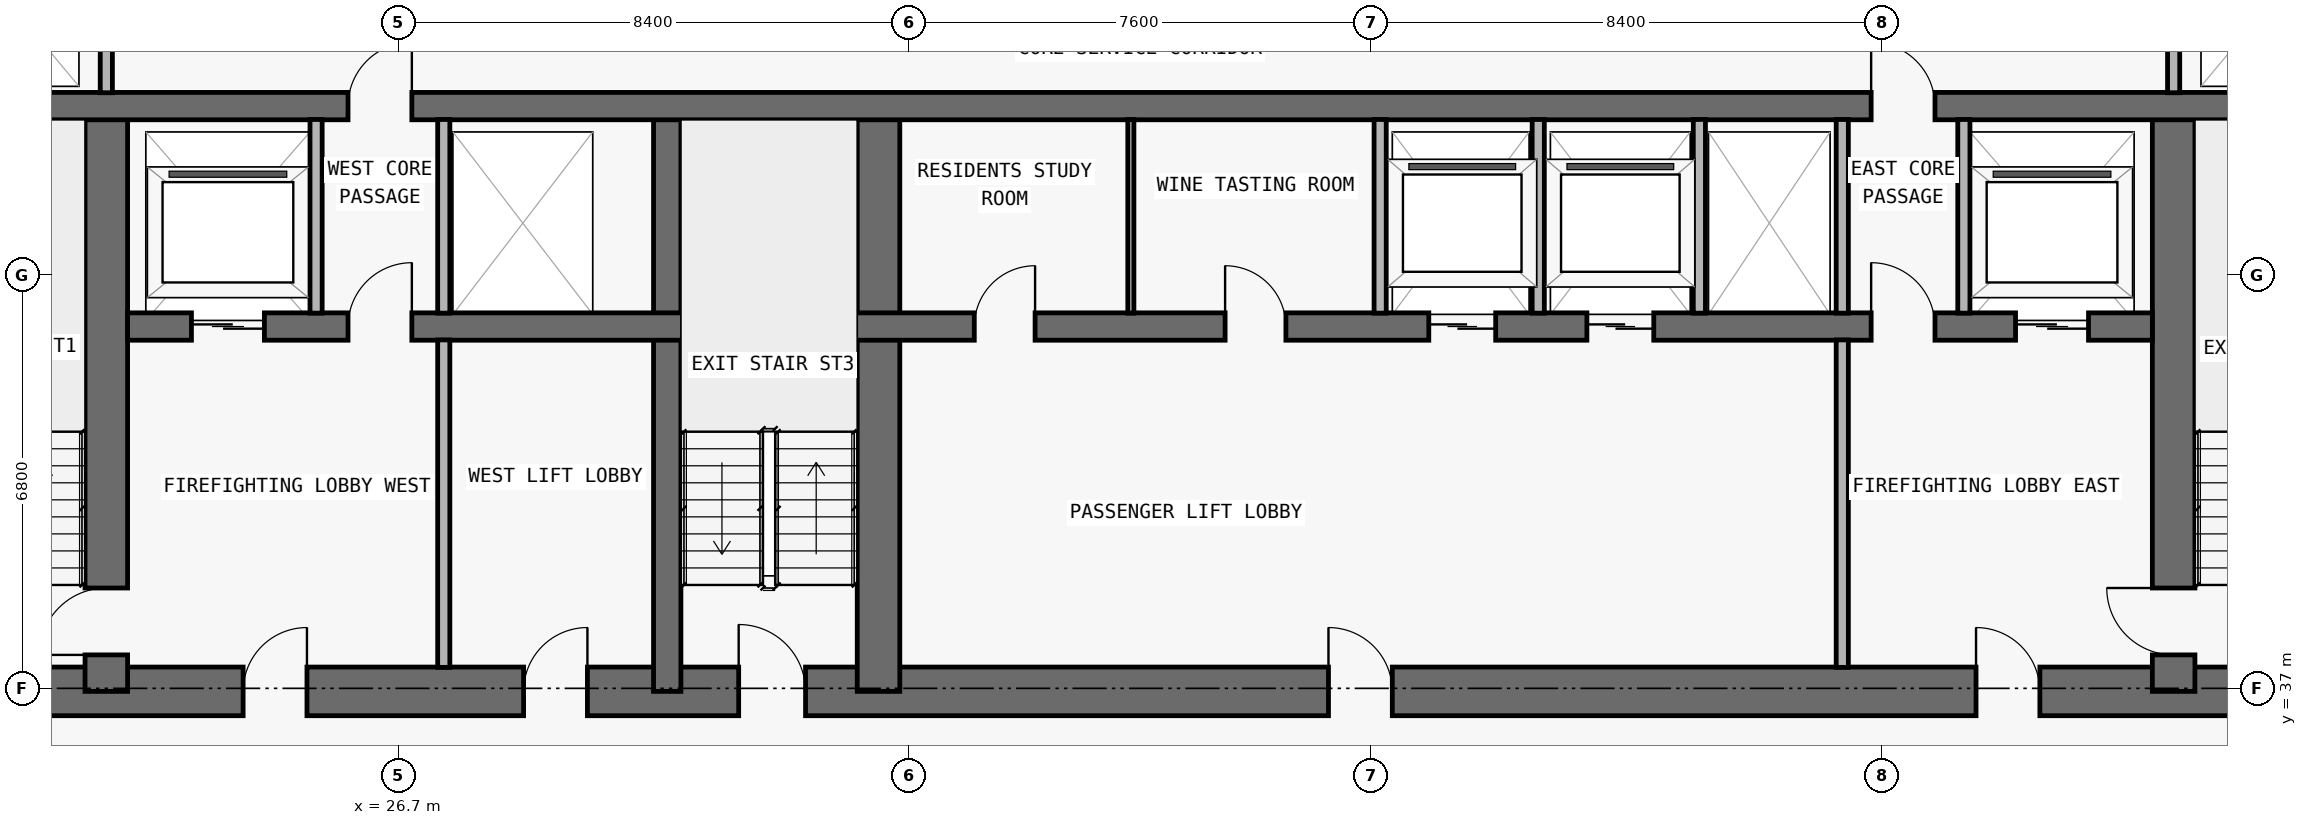
"""IFC4 building model, lengths in metres.
Left out: names, types, materials, properties, quantities, classifications, styles, units other than length and angle.
Written with IfcOpenShell. Run it as: python <this file> out.ifc"""

import sys

from ifc_helpers import new_model, si_unit, direction, frame, frame_2d, origin, place, context, subcontext, project, spatial, rectangle, extrude, element, fill, save


model = new_model("IFC4")
c1 = context("Model", 3, precision=1e-05, world=origin(), true_north=direction((0.0, 1.0)))
c2 = subcontext(c1, "Body", "Model", "MODEL_VIEW")
j1 = project(units=[si_unit("LENGTHUNIT", "METRE"), si_unit("PLANEANGLEUNIT", "RADIAN")], contexts=[c1])
p1 = place(None, origin())
s1 = spatial("IfcSite", under=j1, at=p1, CompositionType="ELEMENT")
p2 = place(p1, origin())
s2 = spatial("IfcBuilding", under=s1, at=p2, CompositionType="ELEMENT")
p3 = place(p2, frame((0.0, 0.0, 109.2)))
s3 = spatial("IfcBuildingStorey", under=s2, at=p3, CompositionType="ELEMENT", Elevation=109.2)
p4 = place(p3, frame((17.85, 36.95, 0.0), z_axis=(0.0, 0.0, 1.0), x_axis=(1.0, 0.0, 0.0)))
e1 = element("IfcWall", 1, at=p4, inside=s3, PredefinedType="SHEAR", context=c2, shape_type="SweptSolid", body=[
    extrude(rectangle(XDim=42.1, YDim=0.8, at=frame_2d((21.05, 0.0))), origin(), (0.0, 0.0, 1.0), 3.05),
])
p5 = place(p4, frame((14.45, 0.0, 0.0)))
e2 = element("IfcOpeningElement", 2, at=p5, cuts=e1, PredefinedType="OPENING", context=c2, shape_type="SweptSolid", body=[
    extrude(rectangle(XDim=1.1, YDim=2.15, at=frame_2d((0.55, 1.075))), frame((0.0, 0.41, 0.0), z_axis=(0.0, -1.0, 0.0), x_axis=(1.0, 0.0, 0.0)), (0.0, 0.0, 1.0), 0.82),
])
p6 = place(p4, frame((6.3, 0.0, 0.0)))
e3 = element("IfcOpeningElement", 3, at=p6, cuts=e1, PredefinedType="OPENING", context=c2, shape_type="SweptSolid", body=[
    extrude(rectangle(XDim=1.05, YDim=2.15, at=frame_2d((0.525, 1.075))), frame((0.0, 0.41, 0.0), z_axis=(0.0, -1.0, 0.0), x_axis=(1.0, 0.0, 0.0)), (0.0, 0.0, 1.0), 0.82),
])
p7 = place(p4, frame((34.8, 0.0, 0.0)))
e4 = element("IfcOpeningElement", 4, at=p7, cuts=e1, PredefinedType="OPENING", context=c2, shape_type="SweptSolid", body=[
    extrude(rectangle(XDim=1.05, YDim=2.15, at=frame_2d((0.525, 1.075))), frame((0.0, 0.41, 0.0), z_axis=(0.0, -1.0, 0.0), x_axis=(1.0, 0.0, 0.0)), (0.0, 0.0, 1.0), 0.82),
])
p8 = place(p4, frame((10.913, 0.0, 0.0)))
e5 = element("IfcOpeningElement", 5, at=p8, cuts=e1, PredefinedType="OPENING", context=c2, shape_type="SweptSolid", body=[
    extrude(rectangle(XDim=1.05, YDim=2.15, at=frame_2d((0.525, 1.075))), frame((0.0, 0.41, 0.0), z_axis=(0.0, -1.0, 0.0), x_axis=(1.0, 0.0, 0.0)), (0.0, 0.0, 1.0), 0.82),
])
p9 = place(p4, frame((24.15, 0.0, 0.0)))
e6 = element("IfcOpeningElement", 6, at=p9, cuts=e1, PredefinedType="OPENING", context=c2, shape_type="SweptSolid", body=[
    extrude(rectangle(XDim=1.05, YDim=2.15, at=frame_2d((0.525, 1.075))), frame((0.0, 0.41, 0.0), z_axis=(0.0, -1.0, 0.0), x_axis=(1.0, 0.0, 0.0)), (0.0, 0.0, 1.0), 0.82),
])
p10 = place(p3, frame((21.9, 36.95, 0.0), z_axis=(0.0, 0.0, 1.0), x_axis=(0.0, 1.0, 0.0)))
e7 = element("IfcWall", 7, at=p10, inside=s3, PredefinedType="SHEAR", context=c2, shape_type="SweptSolid", body=[
    extrude(rectangle(XDim=9.625, YDim=0.7, at=frame_2d((4.812, 0.0))), origin(), (0.0, 0.0, 1.0), 3.05),
])
p11 = place(p10, frame((0.6, 0.0, 0.0)))
e8 = element("IfcOpeningElement", 8, at=p11, cuts=e7, PredefinedType="OPENING", context=c2, shape_type="SweptSolid", body=[
    extrude(rectangle(XDim=1.1, YDim=2.15, at=frame_2d((0.55, 1.075))), frame((0.0, 0.36, 0.0), z_axis=(0.0, -1.0, 0.0), x_axis=(1.0, 0.0, 0.0)), (0.0, 0.0, 1.0), 0.72),
])
p12 = place(p3, frame((55.9, 36.95, 0.0), z_axis=(0.0, 0.0, 1.0), x_axis=(0.0, 1.0, 0.0)))
e9 = element("IfcWall", 9, at=p12, inside=s3, PredefinedType="SHEAR", context=c2, shape_type="SweptSolid", body=[
    extrude(rectangle(XDim=9.625, YDim=0.7, at=frame_2d((4.812, 0.0))), origin(), (0.0, 0.0, 1.0), 3.05),
])
p13 = place(p12, frame((0.6, 0.0, 0.0)))
e10 = element("IfcOpeningElement", 10, at=p13, cuts=e9, PredefinedType="OPENING", context=c2, shape_type="SweptSolid", body=[
    extrude(rectangle(XDim=1.1, YDim=2.15, at=frame_2d((0.55, 1.075))), frame((0.0, 0.36, 0.0), z_axis=(0.0, -1.0, 0.0), x_axis=(1.0, 0.0, 0.0)), (0.0, 0.0, 1.0), 0.72),
])
p14 = place(p3, frame((31.125, 36.95, 0.0), z_axis=(0.0, 0.0, 1.0), x_axis=(0.0, 1.0, 0.0)))
e11 = element("IfcWall", 11, at=p14, inside=s3, PredefinedType="SHEAR", context=c2, shape_type="SweptSolid", body=[
    extrude(rectangle(XDim=9.625, YDim=0.45, at=frame_2d((4.812, 0.0))), origin(), (0.0, 0.0, 1.0), 3.05),
])
p15 = place(p3, frame((34.6, 36.95, 0.0), z_axis=(0.0, 0.0, 1.0), x_axis=(0.0, 1.0, 0.0)))
e12 = element("IfcWall", 12, at=p15, inside=s3, PredefinedType="SHEAR", context=c2, shape_type="SweptSolid", body=[
    extrude(rectangle(XDim=9.625, YDim=0.7, at=frame_2d((4.812, 0.0))), origin(), (0.0, 0.0, 1.0), 3.05),
])
p16 = place(p3, frame((22.25, 42.95, 0.0), z_axis=(0.0, 0.0, 1.0), x_axis=(1.0, 0.0, 0.0)))
e13 = element("IfcWall", 13, at=p16, inside=s3, PredefinedType="SHEAR", context=c2, shape_type="SweptSolid", body=[
    extrude(rectangle(XDim=33.3, YDim=0.45, at=frame_2d((16.65, 0.0))), origin(), (0.0, 0.0, 1.0), 3.05),
])
p17 = place(p16, frame((1.05, 0.0, 0.0)))
e14 = element("IfcOpeningElement", 14, at=p17, cuts=e13, PredefinedType="OPENING", context=c2, shape_type="SweptSolid", body=[
    extrude(rectangle(XDim=1.2, YDim=2.2, at=frame_2d((0.6, 1.1))), frame((0.0, 0.235, 0.0), z_axis=(0.0, -1.0, 0.0), x_axis=(1.0, 0.0, 0.0)), (0.0, 0.0, 1.0), 0.47),
])
p18 = place(p16, frame((31.05, 0.0, 0.0)))
e15 = element("IfcOpeningElement", 15, at=p18, cuts=e13, PredefinedType="OPENING", context=c2, shape_type="SweptSolid", body=[
    extrude(rectangle(XDim=1.2, YDim=2.2, at=frame_2d((0.6, 1.1))), frame((0.0, 0.235, 0.0), z_axis=(0.0, -1.0, 0.0), x_axis=(1.0, 0.0, 0.0)), (0.0, 0.0, 1.0), 0.47),
])
p19 = place(p16, frame((21.4, 0.0, 0.0)))
e16 = element("IfcOpeningElement", 16, at=p19, cuts=e13, PredefinedType="OPENING", context=c2, shape_type="SweptSolid", body=[
    extrude(rectangle(XDim=1.1, YDim=2.2, at=frame_2d((0.55, 1.1))), frame((0.0, 0.235, 0.0), z_axis=(0.0, -1.0, 0.0), x_axis=(1.0, 0.0, 0.0)), (0.0, 0.0, 1.0), 0.47),
])
p20 = place(p16, frame((24.0, 0.0, 0.0)))
e17 = element("IfcOpeningElement", 17, at=p20, cuts=e13, PredefinedType="OPENING", context=c2, shape_type="SweptSolid", body=[
    extrude(rectangle(XDim=1.1, YDim=2.2, at=frame_2d((0.55, 1.1))), frame((0.0, 0.235, 0.0), z_axis=(0.0, -1.0, 0.0), x_axis=(1.0, 0.0, 0.0)), (0.0, 0.0, 1.0), 0.47),
])
p21 = place(p16, frame((3.625, 0.0, 0.0)))
e18 = element("IfcOpeningElement", 18, at=p21, cuts=e13, PredefinedType="OPENING", context=c2, shape_type="SweptSolid", body=[
    extrude(rectangle(XDim=1.05, YDim=2.15, at=frame_2d((0.525, 1.075))), frame((0.0, 0.235, 0.0), z_axis=(0.0, -1.0, 0.0), x_axis=(1.0, 0.0, 0.0)), (0.0, 0.0, 1.0), 0.47),
])
p22 = place(p16, frame((28.675, 0.0, 0.0)))
e19 = element("IfcOpeningElement", 19, at=p22, cuts=e13, PredefinedType="OPENING", context=c2, shape_type="SweptSolid", body=[
    extrude(rectangle(XDim=1.05, YDim=2.15, at=frame_2d((0.525, 1.075))), frame((0.0, 0.235, 0.0), z_axis=(0.0, -1.0, 0.0), x_axis=(1.0, 0.0, 0.0)), (0.0, 0.0, 1.0), 0.47),
])
p23 = place(p16, frame((13.925, 0.0, 0.0)))
e20 = element("IfcOpeningElement", 20, at=p23, cuts=e13, PredefinedType="OPENING", context=c2, shape_type="SweptSolid", body=[
    extrude(rectangle(XDim=1.0, YDim=2.2, at=frame_2d((0.5, 1.1))), frame((0.0, 0.235, 0.0), z_axis=(0.0, -1.0, 0.0), x_axis=(1.0, 0.0, 0.0)), (0.0, 0.0, 1.0), 0.47),
])
p24 = place(p16, frame((18.05, 0.0, 0.0)))
e21 = element("IfcOpeningElement", 21, at=p24, cuts=e13, PredefinedType="OPENING", context=c2, shape_type="SweptSolid", body=[
    extrude(rectangle(XDim=1.0, YDim=2.2, at=frame_2d((0.5, 1.1))), frame((0.0, 0.235, 0.0), z_axis=(0.0, -1.0, 0.0), x_axis=(1.0, 0.0, 0.0)), (0.0, 0.0, 1.0), 0.47),
])
p25 = place(p3, frame((18.25, 46.575, 0.0), z_axis=(0.0, 0.0, 1.0), x_axis=(1.0, 0.0, 0.0)))
e22 = element("IfcWall", 22, at=p25, inside=s3, PredefinedType="SHEAR", context=c2, shape_type="SweptSolid", body=[
    extrude(rectangle(XDim=41.3, YDim=0.45, at=frame_2d((20.65, 0.0))), origin(), (0.0, 0.0, 1.0), 3.05),
])
p26 = place(p25, frame((7.625, 0.0, 0.0)))
e23 = element("IfcOpeningElement", 23, at=p26, cuts=e22, PredefinedType="OPENING", context=c2, shape_type="SweptSolid", body=[
    extrude(rectangle(XDim=1.05, YDim=2.15, at=frame_2d((0.525, 1.075))), frame((0.0, 0.235, 0.0), z_axis=(0.0, -1.0, 0.0), x_axis=(1.0, 0.0, 0.0)), (0.0, 0.0, 1.0), 0.47),
])
p27 = place(p25, frame((32.675, 0.0, 0.0)))
e24 = element("IfcOpeningElement", 24, at=p27, cuts=e22, PredefinedType="OPENING", context=c2, shape_type="SweptSolid", body=[
    extrude(rectangle(XDim=1.05, YDim=2.15, at=frame_2d((0.525, 1.075))), frame((0.0, 0.235, 0.0), z_axis=(0.0, -1.0, 0.0), x_axis=(1.0, 0.0, 0.0)), (0.0, 0.0, 1.0), 0.47),
])
p28 = place(p3, frame((21.9, 46.795, 0.0), z_axis=(0.0, 0.0, 1.0), x_axis=(0.0, 1.0, 0.0)))
e25 = element("IfcWall", 25, at=p28, inside=s3, PredefinedType="PARTITIONING", context=c2, shape_type="SweptSolid", body=[
    extrude(rectangle(XDim=3.16, YDim=0.2, at=frame_2d((1.58, 0.0))), origin(), (0.0, 0.0, 1.0), 3.05),
])
p29 = place(p3, frame((25.35, 43.17, 0.0), z_axis=(0.0, 0.0, 1.0), x_axis=(0.0, 1.0, 0.0)))
e26 = element("IfcWall", 26, at=p29, inside=s3, PredefinedType="PARTITIONING", context=c2, shape_type="SweptSolid", body=[
    extrude(rectangle(XDim=3.185, YDim=0.2, at=frame_2d((1.593, 0.0))), origin(), (0.0, 0.0, 1.0), 3.05),
])
p30 = place(p3, frame((27.45, 37.345, 0.0), z_axis=(0.0, 0.0, 1.0), x_axis=(0.0, 1.0, 0.0)))
e27 = element("IfcWall", 27, at=p30, inside=s3, PredefinedType="PARTITIONING", context=c2, shape_type="SweptSolid", body=[
    extrude(rectangle(XDim=5.385, YDim=0.2, at=frame_2d((2.692, 0.0))), origin(), (0.0, 0.0, 1.0), 3.05),
])
p31 = place(p3, frame((27.45, 43.17, 0.0), z_axis=(0.0, 0.0, 1.0), x_axis=(0.0, 1.0, 0.0)))
e28 = element("IfcWall", 28, at=p31, inside=s3, PredefinedType="PARTITIONING", context=c2, shape_type="SweptSolid", body=[
    extrude(rectangle(XDim=3.185, YDim=0.2, at=frame_2d((1.593, 0.0))), origin(), (0.0, 0.0, 1.0), 3.05),
])
p32 = place(p3, frame((38.75, 43.17, 0.0), z_axis=(0.0, 0.0, 1.0), x_axis=(0.0, 1.0, 0.0)))
e29 = element("IfcWall", 29, at=p32, inside=s3, PredefinedType="MOVABLE", context=c2, shape_type="SweptSolid", body=[
    extrude(rectangle(XDim=3.185, YDim=0.1, at=frame_2d((1.593, 0.0))), origin(), (0.0, 0.0, 1.0), 3.05),
])
for number, where, z_axis, x_axis in (
    (30, (42.85, 43.17, 0.0), (0.0, 0.0, 1.0), (0.0, 1.0, 0.0)),
    (31, (45.45, 43.17, 0.0), (0.0, 0.0, 1.0), (0.0, 1.0, 0.0)),
    (32, (48.1, 43.17, 0.0), (0.0, 0.0, 1.0), (0.0, 1.0, 0.0)),
):
    element("IfcWall", number, at=place(p3, frame(where, z_axis=z_axis, x_axis=x_axis)), inside=s3, PredefinedType="PARTITIONING", context=c2, shape_type="SweptSolid", body=[
        extrude(rectangle(XDim=3.185, YDim=0.2, at=frame_2d((1.593, 0.0))), origin(), (0.0, 0.0, 1.0), 3.05),
    ])
p33 = place(p3, frame((50.45, 37.345, 0.0), z_axis=(0.0, 0.0, 1.0), x_axis=(0.0, 1.0, 0.0)))
e33 = element("IfcWall", 33, at=p33, inside=s3, PredefinedType="PARTITIONING", context=c2, shape_type="SweptSolid", body=[
    extrude(rectangle(XDim=5.385, YDim=0.2, at=frame_2d((2.692, 0.0))), origin(), (0.0, 0.0, 1.0), 3.05),
])
for number, where, z_axis, x_axis in (
    (34, (50.45, 43.17, 0.0), (0.0, 0.0, 1.0), (0.0, 1.0, 0.0)),
    (35, (52.45, 43.17, 0.0), (0.0, 0.0, 1.0), (0.0, 1.0, 0.0)),
):
    element("IfcWall", number, at=place(p3, frame(where, z_axis=z_axis, x_axis=x_axis)), inside=s3, PredefinedType="PARTITIONING", context=c2, shape_type="SweptSolid", body=[
        extrude(rectangle(XDim=3.185, YDim=0.2, at=frame_2d((1.593, 0.0))), origin(), (0.0, 0.0, 1.0), 3.05),
    ])
p34 = place(p3, frame((55.9, 46.795, 0.0), z_axis=(0.0, 0.0, 1.0), x_axis=(0.0, 1.0, 0.0)))
e36 = element("IfcWall", 36, at=p34, inside=s3, PredefinedType="PARTITIONING", context=c2, shape_type="SweptSolid", body=[
    extrude(rectangle(XDim=3.16, YDim=0.2, at=frame_2d((1.58, 0.0))), origin(), (0.0, 0.0, 1.0), 3.05),
])
p35 = place(p17, origin())
e37 = element("IfcDoor", 37, at=p35, inside=s3, OperationType="DOUBLE_DOOR_SLIDING", PredefinedType="DOOR", context=c2, shape_type="SweptSolid", body=[
    extrude(rectangle(XDim=1.2, YDim=2.2, at=frame_2d((0.6, 1.1))), frame((0.0, 0.025, 0.0), z_axis=(0.0, -1.0, 0.0), x_axis=(1.0, 0.0, 0.0)), (0.0, 0.0, 1.0), 0.05),
])
fill(e14, e37)
p36 = place(p18, origin())
e38 = element("IfcDoor", 38, at=p36, inside=s3, OperationType="DOUBLE_DOOR_SLIDING", PredefinedType="DOOR", context=c2, shape_type="SweptSolid", body=[
    extrude(rectangle(XDim=1.2, YDim=2.2, at=frame_2d((0.6, 1.1))), frame((0.0, 0.025, 0.0), z_axis=(0.0, -1.0, 0.0), x_axis=(1.0, 0.0, 0.0)), (0.0, 0.0, 1.0), 0.05),
])
fill(e15, e38)
p37 = place(p19, origin())
e39 = element("IfcDoor", 39, at=p37, inside=s3, OperationType="DOUBLE_DOOR_SLIDING", PredefinedType="DOOR", context=c2, shape_type="SweptSolid", body=[
    extrude(rectangle(XDim=1.1, YDim=2.2, at=frame_2d((0.55, 1.1))), frame((0.0, 0.025, 0.0), z_axis=(0.0, -1.0, 0.0), x_axis=(1.0, 0.0, 0.0)), (0.0, 0.0, 1.0), 0.05),
])
fill(e16, e39)
p38 = place(p20, origin())
e40 = element("IfcDoor", 40, at=p38, inside=s3, OperationType="DOUBLE_DOOR_SLIDING", PredefinedType="DOOR", context=c2, shape_type="SweptSolid", body=[
    extrude(rectangle(XDim=1.1, YDim=2.2, at=frame_2d((0.55, 1.1))), frame((0.0, 0.025, 0.0), z_axis=(0.0, -1.0, 0.0), x_axis=(1.0, 0.0, 0.0)), (0.0, 0.0, 1.0), 0.05),
])
fill(e17, e40)
p39 = place(p5, origin())
e41 = element("IfcDoor", 41, at=p39, inside=s3, OperationType="SINGLE_SWING_LEFT", PredefinedType="DOOR", context=c2, shape_type="SweptSolid", body=[
    extrude(rectangle(XDim=1.1, YDim=2.15, at=frame_2d((0.55, 1.075))), frame((0.0, 0.025, 0.0), z_axis=(0.0, -1.0, 0.0), x_axis=(1.0, 0.0, 0.0)), (0.0, 0.0, 1.0), 0.05),
])
fill(e2, e41)
p40 = place(p6, origin())
e42 = element("IfcDoor", 42, at=p40, inside=s3, OperationType="SINGLE_SWING_RIGHT", PredefinedType="DOOR", context=c2, shape_type="SweptSolid", body=[
    extrude(rectangle(XDim=1.05, YDim=2.15, at=frame_2d((0.525, 1.075))), frame((0.0, 0.025, 0.0), z_axis=(0.0, -1.0, 0.0), x_axis=(1.0, 0.0, 0.0)), (0.0, 0.0, 1.0), 0.05),
])
fill(e3, e42)
p41 = place(p11, origin())
e43 = element("IfcDoor", 43, at=p41, inside=s3, OperationType="SINGLE_SWING_LEFT", PredefinedType="DOOR", context=c2, shape_type="SweptSolid", body=[
    extrude(rectangle(XDim=1.1, YDim=2.15, at=frame_2d((0.55, 1.075))), frame((0.0, 0.025, 0.0), z_axis=(0.0, -1.0, 0.0), x_axis=(1.0, 0.0, 0.0)), (0.0, 0.0, 1.0), 0.05),
])
fill(e8, e43)
p42 = place(p21, origin())
e44 = element("IfcDoor", 44, at=p42, inside=s3, OperationType="SINGLE_SWING_RIGHT", PredefinedType="DOOR", context=c2, shape_type="SweptSolid", body=[
    extrude(rectangle(XDim=1.05, YDim=2.15, at=frame_2d((0.525, 1.075))), frame((0.0, 0.025, 0.0), z_axis=(0.0, -1.0, 0.0), x_axis=(1.0, 0.0, 0.0)), (0.0, 0.0, 1.0), 0.05),
])
fill(e18, e44)
p43 = place(p7, origin())
e45 = element("IfcDoor", 45, at=p43, inside=s3, OperationType="SINGLE_SWING_LEFT", PredefinedType="DOOR", context=c2, shape_type="SweptSolid", body=[
    extrude(rectangle(XDim=1.05, YDim=2.15, at=frame_2d((0.525, 1.075))), frame((0.0, 0.025, 0.0), z_axis=(0.0, -1.0, 0.0), x_axis=(1.0, 0.0, 0.0)), (0.0, 0.0, 1.0), 0.05),
])
fill(e4, e45)
p44 = place(p13, origin())
e46 = element("IfcDoor", 46, at=p44, inside=s3, OperationType="SINGLE_SWING_RIGHT", PredefinedType="DOOR", context=c2, shape_type="SweptSolid", body=[
    extrude(rectangle(XDim=1.1, YDim=2.15, at=frame_2d((0.55, 1.075))), frame((0.0, 0.025, 0.0), z_axis=(0.0, -1.0, 0.0), x_axis=(1.0, 0.0, 0.0)), (0.0, 0.0, 1.0), 0.05),
])
fill(e10, e46)
p45 = place(p22, origin())
e47 = element("IfcDoor", 47, at=p45, inside=s3, OperationType="SINGLE_SWING_LEFT", PredefinedType="DOOR", context=c2, shape_type="SweptSolid", body=[
    extrude(rectangle(XDim=1.05, YDim=2.15, at=frame_2d((0.525, 1.075))), frame((0.0, 0.025, 0.0), z_axis=(0.0, -1.0, 0.0), x_axis=(1.0, 0.0, 0.0)), (0.0, 0.0, 1.0), 0.05),
])
fill(e19, e47)
p46 = place(p8, origin())
e48 = element("IfcDoor", 48, at=p46, inside=s3, OperationType="SINGLE_SWING_RIGHT", PredefinedType="DOOR", context=c2, shape_type="SweptSolid", body=[
    extrude(rectangle(XDim=1.05, YDim=2.15, at=frame_2d((0.525, 1.075))), frame((0.0, 0.025, 0.0), z_axis=(0.0, -1.0, 0.0), x_axis=(1.0, 0.0, 0.0)), (0.0, 0.0, 1.0), 0.05),
])
fill(e5, e48)
p47 = place(p9, origin())
e49 = element("IfcDoor", 49, at=p47, inside=s3, OperationType="SINGLE_SWING_LEFT", PredefinedType="DOOR", context=c2, shape_type="SweptSolid", body=[
    extrude(rectangle(XDim=1.05, YDim=2.15, at=frame_2d((0.525, 1.075))), frame((0.0, 0.025, 0.0), z_axis=(0.0, -1.0, 0.0), x_axis=(1.0, 0.0, 0.0)), (0.0, 0.0, 1.0), 0.05),
])
fill(e6, e49)
p48 = place(p23, origin())
e50 = element("IfcDoor", 50, at=p48, inside=s3, OperationType="SINGLE_SWING_RIGHT", PredefinedType="DOOR", context=c2, shape_type="SweptSolid", body=[
    extrude(rectangle(XDim=1.0, YDim=2.2, at=frame_2d((0.5, 1.1))), frame((0.0, 0.025, 0.0), z_axis=(0.0, -1.0, 0.0), x_axis=(1.0, 0.0, 0.0)), (0.0, 0.0, 1.0), 0.05),
])
fill(e20, e50)
p49 = place(p24, origin())
e51 = element("IfcDoor", 51, at=p49, inside=s3, OperationType="SINGLE_SWING_LEFT", PredefinedType="DOOR", context=c2, shape_type="SweptSolid", body=[
    extrude(rectangle(XDim=1.0, YDim=2.2, at=frame_2d((0.5, 1.1))), frame((0.0, 0.025, 0.0), z_axis=(0.0, -1.0, 0.0), x_axis=(1.0, 0.0, 0.0)), (0.0, 0.0, 1.0), 0.05),
])
fill(e21, e51)
p50 = place(p26, origin())
e52 = element("IfcDoor", 52, at=p50, inside=s3, OperationType="SINGLE_SWING_RIGHT", PredefinedType="DOOR", context=c2, shape_type="SweptSolid", body=[
    extrude(rectangle(XDim=1.05, YDim=2.15, at=frame_2d((0.525, 1.075))), frame((0.0, 0.025, 0.0), z_axis=(0.0, -1.0, 0.0), x_axis=(1.0, 0.0, 0.0)), (0.0, 0.0, 1.0), 0.05),
])
fill(e23, e52)
p51 = place(p27, origin())
e53 = element("IfcDoor", 53, at=p51, inside=s3, OperationType="SINGLE_SWING_LEFT", PredefinedType="DOOR", context=c2, shape_type="SweptSolid", body=[
    extrude(rectangle(XDim=1.05, YDim=2.15, at=frame_2d((0.525, 1.075))), frame((0.0, 0.025, 0.0), z_axis=(0.0, -1.0, 0.0), x_axis=(1.0, 0.0, 0.0)), (0.0, 0.0, 1.0), 0.05),
])
fill(e24, e53)
save(model, sys.argv[1])
